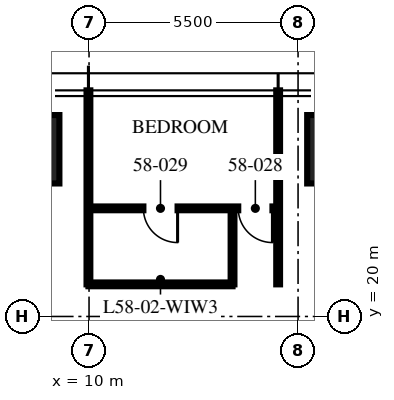
"""IFC4 building model, lengths in metres.
Left out: names, types, materials, properties, quantities, classifications, styles, units other than length and angle.
Written with IfcOpenShell. Run it as: python <this file> out.ifc"""

import sys

from ifc_helpers import new_model, si_unit, direction, frame, frame_2d, origin, origin_2d, place, context, subcontext, project, spatial, rectangle, extrude, element, fill, save


model = new_model("IFC4")
c1 = context("Model", 3, precision=1e-05, world=origin(), true_north=direction((0.0, 1.0)))
c2 = subcontext(c1, "Body", "Model", "MODEL_VIEW")
j1 = project(units=[si_unit("LENGTHUNIT", "METRE"), si_unit("PLANEANGLEUNIT", "RADIAN")], contexts=[c1])
p1 = place(None, origin())
s1 = spatial("IfcSite", under=j1, at=p1, CompositionType="ELEMENT")
p2 = place(p1, origin())
s2 = spatial("IfcBuilding", under=s1, at=p2, CompositionType="ELEMENT")
p3 = place(p2, frame((0.0, 0.0, 233.25)))
s3 = spatial("IfcBuildingStorey", under=s2, at=p3, CompositionType="ELEMENT", Elevation=233.25)
for number, where, z_axis, x_axis in (
    (1, (8.32, 24.4, 0.0), (0.0, 0.0, 1.0), (1.0, 0.0, 0.0)),
    (2, (16.64, 24.4, 0.0), (0.0, 0.0, 1.0), (1.0, 0.0, 0.0)),
):
    element("IfcColumn", number, at=place(p3, frame(where, z_axis=z_axis, x_axis=x_axis)), inside=s3, PredefinedType="COLUMN", context=c2, shape_type="SweptSolid", body=[
        extrude(rectangle(XDim=1.8, YDim=1.8, at=origin_2d()), origin(), (0.0, 0.0, 1.0), 3.75),
    ])
for number, where, z_axis, x_axis in (
    (3, (14.976, 20.845, 0.0), (0.0, 0.0, 1.0), (0.0, 1.0, 0.0)),
    (4, (9.984, 20.845, 0.0), (0.0, 0.0, 1.0), (0.0, 1.0, 0.0)),
):
    element("IfcWall", number, at=place(p3, frame(where, z_axis=z_axis, x_axis=x_axis)), inside=s3, PredefinedType="PARTITIONING", context=c2, shape_type="SweptSolid", body=[
        extrude(rectangle(XDim=5.105, YDim=0.1, at=frame_2d((2.552, 0.0))), origin(), (0.0, 0.0, 1.0), 2.91),
    ])
p4 = place(p3, frame((14.976, 22.845, 0.0), z_axis=(0.0, 0.0, 1.0), x_axis=(-1.0, 0.0, 0.0)))
e5 = element("IfcWall", 5, at=p4, inside=s3, PredefinedType="PARTITIONING", context=c2, shape_type="SweptSolid", body=[
    extrude(rectangle(XDim=4.992, YDim=0.1, at=frame_2d((2.496, 0.0))), origin(), (0.0, 0.0, 1.0), 2.81),
])
p5 = place(p4, frame((0.15, 0.0, 0.0)))
e6 = element("IfcOpeningElement", 6, at=p5, cuts=e5, PredefinedType="OPENING", context=c2, shape_type="SweptSolid", body=[
    extrude(rectangle(XDim=0.9, YDim=2.1, at=frame_2d((0.45, 1.05))), frame((0.0, 0.06, 0.0), z_axis=(0.0, -1.0, 0.0), x_axis=(1.0, 0.0, 0.0)), (0.0, 0.0, 1.0), 0.12),
])
p6 = place(p4, frame((2.646, 0.0, 0.0)))
e7 = element("IfcOpeningElement", 7, at=p6, cuts=e5, PredefinedType="OPENING", context=c2, shape_type="SweptSolid", body=[
    extrude(rectangle(XDim=0.9, YDim=2.1, at=frame_2d((0.45, 1.05))), frame((0.0, 0.06, 0.0), z_axis=(0.0, -1.0, 0.0), x_axis=(1.0, 0.0, 0.0)), (0.0, 0.0, 1.0), 0.12),
])
p7 = place(p3, frame((13.776, 20.845, 0.0), z_axis=(0.0, 0.0, 1.0), x_axis=(0.0, 1.0, 0.0)))
e8 = element("IfcWall", 8, at=p7, inside=s3, PredefinedType="PARTITIONING", context=c2, shape_type="SweptSolid", body=[
    extrude(rectangle(XDim=2.0, YDim=0.1, at=frame_2d((1.0, 0.0))), origin(), (0.0, 0.0, 1.0), 3.5),
])
p8 = place(p3, frame((13.776, 20.845, 0.0), z_axis=(0.0, 0.0, 1.0), x_axis=(-1.0, 0.0, 0.0)))
e9 = element("IfcWall", 9, at=p8, inside=s3, PredefinedType="PARTITIONING", context=c2, shape_type="SweptSolid", body=[
    extrude(rectangle(XDim=3.792, YDim=0.1, at=frame_2d((1.896, 0.0))), origin(), (0.0, 0.0, 1.0), 2.81),
])
p9 = place(p5, origin())
e10 = element("IfcDoor", 10, at=p9, inside=s3, OperationType="SINGLE_SWING_LEFT", PredefinedType="DOOR", context=c2, shape_type="SweptSolid", body=[
    extrude(rectangle(XDim=0.9, YDim=2.1, at=frame_2d((0.45, 1.05))), frame((0.0, 0.025, 0.0), z_axis=(0.0, -1.0, 0.0), x_axis=(1.0, 0.0, 0.0)), (0.0, 0.0, 1.0), 0.05),
])
fill(e6, e10)
p10 = place(p6, origin())
e11 = element("IfcDoor", 11, at=p10, inside=s3, OperationType="SINGLE_SWING_LEFT", PredefinedType="DOOR", context=c2, shape_type="SweptSolid", body=[
    extrude(rectangle(XDim=0.9, YDim=2.1, at=frame_2d((0.45, 1.05))), frame((0.0, 0.025, 0.0), z_axis=(0.0, -1.0, 0.0), x_axis=(1.0, 0.0, 0.0)), (0.0, 0.0, 1.0), 0.05),
])
fill(e7, e11)
save(model, sys.argv[1])
